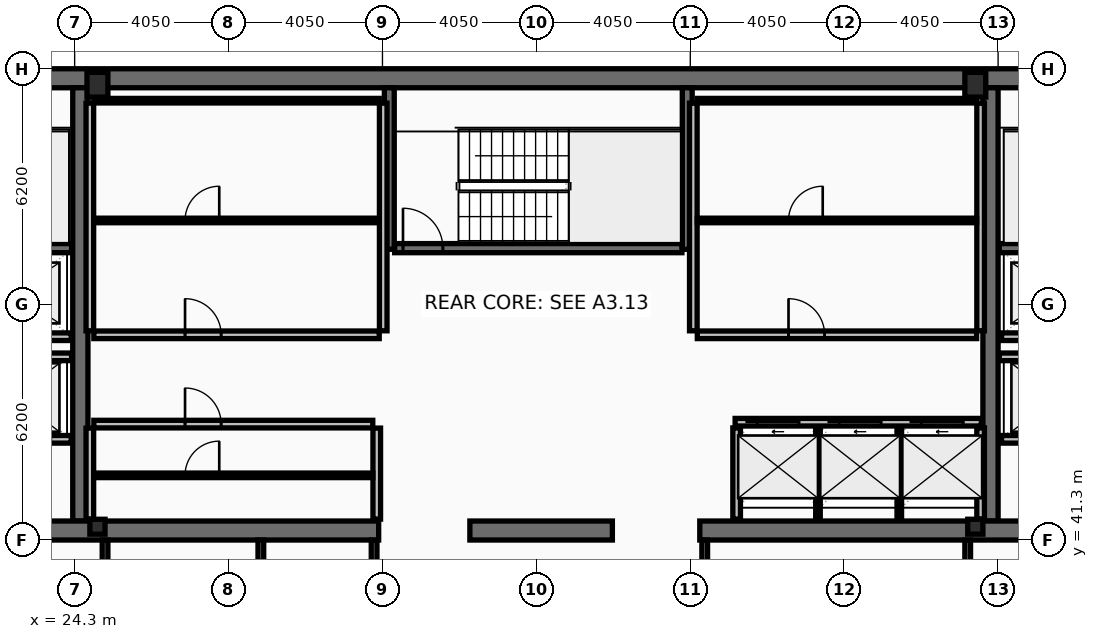
"""IFC4 building model, lengths in metres.
Left out: names, types, materials, properties, quantities, classifications, styles, units other than length and angle.
Written with IfcOpenShell. Run it as: python <this file> out.ifc"""

import sys

from ifc_helpers import new_model, si_unit, direction, frame, frame_2d, origin, origin_2d, place, context, subcontext, project, spatial, rectangle, hollow_rectangle, i_section, extrude, element, fill, save


model = new_model("IFC4")
c1 = context("Model", 3, precision=1e-05, world=origin(), true_north=direction((0.0, 1.0)))
c2 = subcontext(c1, "Body", "Model", "MODEL_VIEW")
j1 = project(units=[si_unit("LENGTHUNIT", "METRE"), si_unit("PLANEANGLEUNIT", "RADIAN")], contexts=[c1])
p1 = place(None, origin())
s1 = spatial("IfcSite", under=j1, at=p1, CompositionType="ELEMENT")
p2 = place(p1, origin())
s2 = spatial("IfcBuilding", under=s1, at=p2, CompositionType="ELEMENT")
p3 = place(p2, frame((0.0, 0.0, 302.2)))
s3 = spatial("IfcBuildingStorey", under=s2, at=p3, CompositionType="ELEMENT", Elevation=302.2)
p4 = place(p3, frame((16.2, 53.45, 0.0), z_axis=(0.0, 0.0, 1.0), x_axis=(1.0, 0.0, 0.0)))
e1 = element("IfcWall", 1, at=p4, inside=s3, PredefinedType="SHEAR", context=c2, shape_type="SweptSolid", body=[
    extrude(rectangle(XDim=40.5, YDim=0.5, at=frame_2d((20.25, 0.0))), origin(), (0.0, 0.0, 1.0), 3.38),
])
for number, where, z_axis, x_axis in (
    (2, (24.45, 41.8, 0.0), (0.0, 0.0, 1.0), (0.0, 1.0, 0.0)),
    (3, (48.4, 41.8, 0.0), (0.0, 0.0, 1.0), (0.0, 1.0, 0.0)),
):
    element("IfcWall", number, at=place(p3, frame(where, z_axis=z_axis, x_axis=x_axis)), inside=s3, PredefinedType="SHEAR", context=c2, shape_type="SweptSolid", body=[
        extrude(rectangle(XDim=11.4, YDim=0.4, at=frame_2d((5.7, 0.0))), origin(), (0.0, 0.0, 1.0), 3.38),
    ])
p5 = place(p3, frame((32.3, 41.55, 0.0), z_axis=(0.0, 0.0, 1.0), x_axis=(-1.0, 0.0, 0.0)))
e4 = element("IfcWall", 4, at=p5, inside=s3, PredefinedType="SHEAR", context=c2, shape_type="SweptSolid", body=[
    extrude(rectangle(XDim=11.45, YDim=0.5, at=frame_2d((5.725, 0.0))), origin(), (0.0, 0.0, 1.0), 3.38),
])
p6 = place(p3, frame((38.45, 41.55, 0.0), z_axis=(0.0, 0.0, 1.0), x_axis=(-1.0, 0.0, 0.0)))
e5 = element("IfcWall", 5, at=p6, inside=s3, PredefinedType="SHEAR", context=c2, shape_type="SweptSolid", body=[
    extrude(rectangle(XDim=3.75, YDim=0.5, at=frame_2d((1.875, 0.0))), origin(), (0.0, 0.0, 1.0), 3.38),
])
p7 = place(p3, frame((52.05, 41.55, 0.0), z_axis=(0.0, 0.0, 1.0), x_axis=(-1.0, 0.0, 0.0)))
e6 = element("IfcWall", 6, at=p7, inside=s3, PredefinedType="SHEAR", context=c2, shape_type="SweptSolid", body=[
    extrude(rectangle(XDim=11.3, YDim=0.5, at=frame_2d((5.65, 0.0))), origin(), (0.0, 0.0, 1.0), 3.38),
])
for number, where, z_axis, x_axis in (
    (7, (32.58, 48.95, 0.0), (0.0, 0.0, 1.0), (0.0, 1.0, 0.0)),
    (8, (40.42, 48.95, 0.0), (0.0, 0.0, 1.0), (0.0, 1.0, 0.0)),
):
    element("IfcWall", number, at=place(p3, frame(where, z_axis=z_axis, x_axis=x_axis)), inside=s3, PredefinedType="SHEAR", context=c2, shape_type="SweptSolid", body=[
        extrude(rectangle(XDim=4.25, YDim=0.26, at=frame_2d((2.125, 0.0))), origin(), (0.0, 0.0, 1.0), 3.38),
    ])
p8 = place(p3, frame((16.7, 48.98, 0.0), z_axis=(0.0, 0.0, 1.0), x_axis=(1.0, 0.0, 0.0)))
e9 = element("IfcWall", 9, at=p8, inside=s3, PredefinedType="SHEAR", context=c2, shape_type="SweptSolid", body=[
    extrude(rectangle(XDim=7.52, YDim=0.24, at=frame_2d((3.76, 0.0))), origin(), (0.0, 0.0, 1.0), 3.38),
])
p9 = place(p8, frame((0.22, 0.0, 0.0)))
e10 = element("IfcOpeningElement", 10, at=p9, cuts=e9, PredefinedType="OPENING", context=c2, shape_type="SweptSolid", body=[
    extrude(rectangle(XDim=1.05, YDim=2.15, at=frame_2d((0.525, 1.075))), frame((0.0, 0.13, 0.0), z_axis=(0.0, -1.0, 0.0), x_axis=(1.0, 0.0, 0.0)), (0.0, 0.0, 1.0), 0.26),
])
p10 = place(p3, frame((48.63, 48.98, 0.0), z_axis=(0.0, 0.0, 1.0), x_axis=(1.0, 0.0, 0.0)))
e11 = element("IfcWall", 11, at=p10, inside=s3, PredefinedType="SHEAR", context=c2, shape_type="SweptSolid", body=[
    extrude(rectangle(XDim=7.57, YDim=0.24, at=frame_2d((3.785, 0.0))), origin(), (0.0, 0.0, 1.0), 3.38),
])
p11 = place(p10, frame((6.3, 0.0, 0.0)))
e12 = element("IfcOpeningElement", 12, at=p11, cuts=e11, PredefinedType="OPENING", context=c2, shape_type="SweptSolid", body=[
    extrude(rectangle(XDim=1.05, YDim=2.15, at=frame_2d((0.525, 1.075))), frame((0.0, 0.13, 0.0), z_axis=(0.0, -1.0, 0.0), x_axis=(1.0, 0.0, 0.0)), (0.0, 0.0, 1.0), 0.26),
])
p12 = place(p3, frame((32.72, 48.98, 0.0), z_axis=(0.0, 0.0, 1.0), x_axis=(1.0, 0.0, 0.0)))
e13 = element("IfcWall", 13, at=p12, inside=s3, PredefinedType="SHEAR", context=c2, shape_type="SweptSolid", body=[
    extrude(rectangle(XDim=7.56, YDim=0.24, at=frame_2d((3.78, 0.0))), origin(), (0.0, 0.0, 1.0), 3.38),
])
p13 = place(p12, frame((0.22, 0.0, 0.0)))
e14 = element("IfcOpeningElement", 14, at=p13, cuts=e13, PredefinedType="OPENING", context=c2, shape_type="SweptSolid", body=[
    extrude(rectangle(XDim=1.05, YDim=2.15, at=frame_2d((0.525, 1.075))), frame((0.0, 0.13, 0.0), z_axis=(0.0, -1.0, 0.0), x_axis=(1.0, 0.0, 0.0)), (0.0, 0.0, 1.0), 0.26),
])
for number, where, z_axis, x_axis in (
    (15, (24.9, 53.28, 0.0), (0.0, 0.0, 1.0), (1.0, 0.0, 0.0)),
    (16, (48.0, 53.28, 0.0), (0.0, 0.0, 1.0), (1.0, 0.0, 0.0)),
):
    element("IfcColumn", number, at=place(p3, frame(where, z_axis=z_axis, x_axis=x_axis)), inside=s3, PredefinedType="COLUMN", context=c2, shape_type="SweptSolid", body=[
        extrude(hollow_rectangle(XDim=0.55, YDim=0.65, WallThickness=0.04, at=origin_2d()), origin(), (0.0, 0.0, 1.0), 3.6),
    ])
for number, where, z_axis, x_axis in (
    (17, (24.9, 41.65, 0.0), (0.0, 0.0, 1.0), (1.0, 0.0, 0.0)),
    (18, (48.0, 41.65, 0.0), (0.0, 0.0, 1.0), (1.0, 0.0, 0.0)),
):
    element("IfcColumn", number, at=place(p3, frame(where, z_axis=z_axis, x_axis=x_axis)), inside=s3, PredefinedType="COLUMN", context=c2, shape_type="SweptSolid", body=[
        extrude(i_section(OverallWidth=0.399, OverallDepth=0.393, WebThickness=0.023, FlangeThickness=0.037, at=origin_2d()), origin(), (0.0, 0.0, 1.0), 3.6),
    ])
p14 = place(p3, frame((41.68, 44.4, 0.0), z_axis=(0.0, 0.0, 1.0), x_axis=(1.0, 0.0, 0.0)))
e19 = element("IfcWall", 19, at=p14, inside=s3, PredefinedType="PARTITIONING", context=c2, shape_type="SweptSolid", body=[
    extrude(rectangle(XDim=6.48, YDim=0.2, at=frame_2d((3.24, 0.0))), origin(), (0.0, 0.0, 1.0), 3.38),
])
p15 = place(p14, frame((0.58, 0.0, 0.0)))
e20 = element("IfcOpeningElement", 20, at=p15, cuts=e19, PredefinedType="OPENING", context=c2, shape_type="SweptSolid", body=[
    extrude(rectangle(XDim=1.1, YDim=2.18, at=frame_2d((0.55, 1.09))), frame((0.0, 0.11, 0.0), z_axis=(0.0, -1.0, 0.0), x_axis=(1.0, 0.0, 0.0)), (0.0, 0.0, 1.0), 0.22),
])
p16 = place(p14, frame((2.74, 0.0, 0.0)))
e21 = element("IfcOpeningElement", 21, at=p16, cuts=e19, PredefinedType="OPENING", context=c2, shape_type="SweptSolid", body=[
    extrude(rectangle(XDim=1.1, YDim=2.18, at=frame_2d((0.55, 1.09))), frame((0.0, 0.11, 0.0), z_axis=(0.0, -1.0, 0.0), x_axis=(1.0, 0.0, 0.0)), (0.0, 0.0, 1.0), 0.22),
])
p17 = place(p14, frame((4.9, 0.0, 0.0)))
e22 = element("IfcOpeningElement", 22, at=p17, cuts=e19, PredefinedType="OPENING", context=c2, shape_type="SweptSolid", body=[
    extrude(rectangle(XDim=1.1, YDim=2.18, at=frame_2d((0.55, 1.09))), frame((0.0, 0.11, 0.0), z_axis=(0.0, -1.0, 0.0), x_axis=(1.0, 0.0, 0.0)), (0.0, 0.0, 1.0), 0.22),
])
p18 = place(p3, frame((51.61, 43.95, 0.0), z_axis=(0.0, 0.0, 1.0), x_axis=(-1.0, 0.0, 0.0)))
e23 = element("IfcWall", 23, at=p18, inside=s3, PredefinedType="PARTITIONING", context=c2, shape_type="SweptSolid", body=[
    extrude(rectangle(XDim=2.92, YDim=0.2, at=frame_2d((1.46, 0.0))), origin(), (0.0, 0.0, 1.0), 3.38),
])
p19 = place(p18, frame((0.81, 0.0, 0.0)))
e24 = element("IfcOpeningElement", 24, at=p19, cuts=e23, PredefinedType="OPENING", context=c2, shape_type="SweptSolid", body=[
    extrude(rectangle(XDim=1.3, YDim=2.18, at=frame_2d((0.65, 1.09))), frame((0.0, 0.11, 0.0), z_axis=(0.0, -1.0, 0.0), x_axis=(1.0, 0.0, 0.0)), (0.0, 0.0, 1.0), 0.22),
])
p20 = place(p3, frame((24.21, 43.95, 0.0), z_axis=(0.0, 0.0, 1.0), x_axis=(-1.0, 0.0, 0.0)))
e25 = element("IfcWall", 25, at=p20, inside=s3, PredefinedType="PARTITIONING", context=c2, shape_type="SweptSolid", body=[
    extrude(rectangle(XDim=2.97, YDim=0.2, at=frame_2d((1.485, 0.0))), origin(), (0.0, 0.0, 1.0), 3.38),
])
p21 = place(p20, frame((0.86, 0.0, 0.0)))
e26 = element("IfcOpeningElement", 26, at=p21, cuts=e25, PredefinedType="OPENING", context=c2, shape_type="SweptSolid", body=[
    extrude(rectangle(XDim=1.3, YDim=2.18, at=frame_2d((0.65, 1.09))), frame((0.0, 0.11, 0.0), z_axis=(0.0, -1.0, 0.0), x_axis=(1.0, 0.0, 0.0)), (0.0, 0.0, 1.0), 0.22),
])
p22 = place(p3, frame((51.61, 46.65, 0.0), z_axis=(0.0, 0.0, 1.0), x_axis=(-1.0, 0.0, 0.0)))
e27 = element("IfcWall", 27, at=p22, inside=s3, PredefinedType="PARTITIONING", context=c2, shape_type="SweptSolid", body=[
    extrude(rectangle(XDim=2.92, YDim=0.2, at=frame_2d((1.46, 0.0))), origin(), (0.0, 0.0, 1.0), 3.38),
])
p23 = place(p22, frame((0.86, 0.0, 0.0)))
e28 = element("IfcOpeningElement", 28, at=p23, cuts=e27, PredefinedType="OPENING", context=c2, shape_type="SweptSolid", body=[
    extrude(rectangle(XDim=1.2, YDim=2.18, at=frame_2d((0.6, 1.09))), frame((0.0, 0.11, 0.0), z_axis=(0.0, -1.0, 0.0), x_axis=(1.0, 0.0, 0.0)), (0.0, 0.0, 1.0), 0.22),
])
p24 = place(p3, frame((24.21, 46.65, 0.0), z_axis=(0.0, 0.0, 1.0), x_axis=(-1.0, 0.0, 0.0)))
e29 = element("IfcWall", 29, at=p24, inside=s3, PredefinedType="PARTITIONING", context=c2, shape_type="SweptSolid", body=[
    extrude(rectangle(XDim=2.97, YDim=0.2, at=frame_2d((1.485, 0.0))), origin(), (0.0, 0.0, 1.0), 3.38),
])
p25 = place(p24, frame((0.91, 0.0, 0.0)))
e30 = element("IfcOpeningElement", 30, at=p25, cuts=e29, PredefinedType="OPENING", context=c2, shape_type="SweptSolid", body=[
    extrude(rectangle(XDim=1.2, YDim=2.18, at=frame_2d((0.6, 1.09))), frame((0.0, 0.11, 0.0), z_axis=(0.0, -1.0, 0.0), x_axis=(1.0, 0.0, 0.0)), (0.0, 0.0, 1.0), 0.22),
])
p26 = place(p3, frame((21.2, 46.12, 0.0), z_axis=(0.0, 0.0, 1.0), x_axis=(1.0, 0.0, 0.0)))
e31 = element("IfcWall", 31, at=p26, inside=s3, PredefinedType="PARTITIONING", context=c2, shape_type="SweptSolid", body=[
    extrude(rectangle(XDim=3.02, YDim=0.2, at=frame_2d((1.51, 0.0))), origin(), (0.0, 0.0, 1.0), 3.38),
])
p27 = place(p3, frame((48.63, 46.12, 0.0), z_axis=(0.0, 0.0, 1.0), x_axis=(1.0, 0.0, 0.0)))
e32 = element("IfcWall", 32, at=p27, inside=s3, PredefinedType="PARTITIONING", context=c2, shape_type="SweptSolid", body=[
    extrude(rectangle(XDim=3.07, YDim=0.2, at=frame_2d((1.535, 0.0))), origin(), (0.0, 0.0, 1.0), 3.38),
])
for number, where, z_axis, x_axis in (
    (33, (24.7, 46.805, 0.0), (0.0, 0.0, 1.0), (0.0, 1.0, 0.0)),
    (34, (32.42, 46.805, 0.0), (0.0, 0.0, 1.0), (0.0, 1.0, 0.0)),
):
    element("IfcWall", number, at=place(p3, frame(where, z_axis=z_axis, x_axis=x_axis)), inside=s3, PredefinedType="PARTITIONING", context=c2, shape_type="SweptSolid", body=[
        extrude(rectangle(XDim=5.99, YDim=0.2, at=frame_2d((2.995, 0.0))), origin(), (0.0, 0.0, 1.0), 3.38),
    ])
p28 = place(p3, frame((24.805, 52.86, 0.0), z_axis=(0.0, 0.0, 1.0), x_axis=(1.0, 0.0, 0.0)))
e35 = element("IfcWall", 35, at=p28, inside=s3, PredefinedType="PARTITIONING", context=c2, shape_type="SweptSolid", body=[
    extrude(rectangle(XDim=7.51, YDim=0.12, at=frame_2d((3.755, 0.0))), origin(), (0.0, 0.0, 1.0), 3.38),
])
p29 = place(p3, frame((24.805, 49.709, 0.0), z_axis=(0.0, 0.0, 1.0), x_axis=(1.0, 0.0, 0.0)))
e36 = element("IfcWall", 36, at=p29, inside=s3, PredefinedType="PARTITIONING", context=c2, shape_type="SweptSolid", body=[
    extrude(rectangle(XDim=7.51, YDim=0.12, at=frame_2d((3.755, 0.0))), origin(), (0.0, 0.0, 1.0), 3.38),
])
p30 = place(p29, frame((2.4, 0.0, 0.0)))
e37 = element("IfcOpeningElement", 37, at=p30, cuts=e36, PredefinedType="OPENING", context=c2, shape_type="SweptSolid", body=[
    extrude(rectangle(XDim=0.9, YDim=2.05, at=frame_2d((0.45, 1.025))), frame((0.0, 0.07, 0.0), z_axis=(0.0, -1.0, 0.0), x_axis=(1.0, 0.0, 0.0)), (0.0, 0.0, 1.0), 0.14),
])
p31 = place(p3, frame((24.805, 46.7, 0.0), z_axis=(0.0, 0.0, 1.0), x_axis=(1.0, 0.0, 0.0)))
e38 = element("IfcWall", 38, at=p31, inside=s3, PredefinedType="PARTITIONING", context=c2, shape_type="SweptSolid", body=[
    extrude(rectangle(XDim=7.51, YDim=0.2, at=frame_2d((3.755, 0.0))), origin(), (0.0, 0.0, 1.0), 3.38),
])
p32 = place(p31, frame((2.4, 0.0, 0.0)))
e39 = element("IfcOpeningElement", 39, at=p32, cuts=e38, PredefinedType="OPENING", context=c2, shape_type="SweptSolid", body=[
    extrude(rectangle(XDim=0.95, YDim=2.1, at=frame_2d((0.475, 1.05))), frame((0.0, 0.11, 0.0), z_axis=(0.0, -1.0, 0.0), x_axis=(1.0, 0.0, 0.0)), (0.0, 0.0, 1.0), 0.22),
])
for number, where, z_axis, x_axis in (
    (40, (24.7, 41.85, 0.0), (0.0, 0.0, 1.0), (0.0, 1.0, 0.0)),
    (41, (32.25, 41.85, 0.0), (0.0, 0.0, 1.0), (0.0, 1.0, 0.0)),
):
    element("IfcWall", number, at=place(p3, frame(where, z_axis=z_axis, x_axis=x_axis)), inside=s3, PredefinedType="PARTITIONING", context=c2, shape_type="SweptSolid", body=[
        extrude(rectangle(XDim=2.395, YDim=0.2, at=frame_2d((1.198, 0.0))), origin(), (0.0, 0.0, 1.0), 3.38),
    ])
p33 = place(p3, frame((24.805, 43.002, 0.0), z_axis=(0.0, 0.0, 1.0), x_axis=(1.0, 0.0, 0.0)))
e42 = element("IfcWall", 42, at=p33, inside=s3, PredefinedType="PARTITIONING", context=c2, shape_type="SweptSolid", body=[
    extrude(rectangle(XDim=7.34, YDim=0.12, at=frame_2d((3.67, 0.0))), origin(), (0.0, 0.0, 1.0), 3.38),
])
p34 = place(p33, frame((2.4, 0.0, 0.0)))
e43 = element("IfcOpeningElement", 43, at=p34, cuts=e42, PredefinedType="OPENING", context=c2, shape_type="SweptSolid", body=[
    extrude(rectangle(XDim=0.9, YDim=2.05, at=frame_2d((0.45, 1.025))), frame((0.0, 0.07, 0.0), z_axis=(0.0, -1.0, 0.0), x_axis=(1.0, 0.0, 0.0)), (0.0, 0.0, 1.0), 0.14),
])
p35 = place(p3, frame((24.805, 44.35, 0.0), z_axis=(0.0, 0.0, 1.0), x_axis=(1.0, 0.0, 0.0)))
e44 = element("IfcWall", 44, at=p35, inside=s3, PredefinedType="PARTITIONING", context=c2, shape_type="SweptSolid", body=[
    extrude(rectangle(XDim=7.34, YDim=0.2, at=frame_2d((3.67, 0.0))), origin(), (0.0, 0.0, 1.0), 3.38),
])
p36 = place(p35, frame((2.4, 0.0, 0.0)))
e45 = element("IfcOpeningElement", 45, at=p36, cuts=e44, PredefinedType="OPENING", context=c2, shape_type="SweptSolid", body=[
    extrude(rectangle(XDim=0.95, YDim=2.1, at=frame_2d((0.475, 1.05))), frame((0.0, 0.11, 0.0), z_axis=(0.0, -1.0, 0.0), x_axis=(1.0, 0.0, 0.0)), (0.0, 0.0, 1.0), 0.22),
])
for number, where, z_axis, x_axis in (
    (46, (40.58, 46.805, 0.0), (0.0, 0.0, 1.0), (0.0, 1.0, 0.0)),
    (47, (48.14, 46.805, 0.0), (0.0, 0.0, 1.0), (0.0, 1.0, 0.0)),
):
    element("IfcWall", number, at=place(p3, frame(where, z_axis=z_axis, x_axis=x_axis)), inside=s3, PredefinedType="PARTITIONING", context=c2, shape_type="SweptSolid", body=[
        extrude(rectangle(XDim=5.99, YDim=0.2, at=frame_2d((2.995, 0.0))), origin(), (0.0, 0.0, 1.0), 3.38),
    ])
p37 = place(p3, frame((40.685, 52.86, 0.0), z_axis=(0.0, 0.0, 1.0), x_axis=(1.0, 0.0, 0.0)))
e48 = element("IfcWall", 48, at=p37, inside=s3, PredefinedType="PARTITIONING", context=c2, shape_type="SweptSolid", body=[
    extrude(rectangle(XDim=7.35, YDim=0.12, at=frame_2d((3.675, 0.0))), origin(), (0.0, 0.0, 1.0), 3.38),
])
p38 = place(p3, frame((40.685, 49.709, 0.0), z_axis=(0.0, 0.0, 1.0), x_axis=(1.0, 0.0, 0.0)))
e49 = element("IfcWall", 49, at=p38, inside=s3, PredefinedType="PARTITIONING", context=c2, shape_type="SweptSolid", body=[
    extrude(rectangle(XDim=7.35, YDim=0.12, at=frame_2d((3.675, 0.0))), origin(), (0.0, 0.0, 1.0), 3.38),
])
p39 = place(p38, frame((2.4, 0.0, 0.0)))
e50 = element("IfcOpeningElement", 50, at=p39, cuts=e49, PredefinedType="OPENING", context=c2, shape_type="SweptSolid", body=[
    extrude(rectangle(XDim=0.9, YDim=2.05, at=frame_2d((0.45, 1.025))), frame((0.0, 0.07, 0.0), z_axis=(0.0, -1.0, 0.0), x_axis=(1.0, 0.0, 0.0)), (0.0, 0.0, 1.0), 0.14),
])
p40 = place(p3, frame((40.685, 46.7, 0.0), z_axis=(0.0, 0.0, 1.0), x_axis=(1.0, 0.0, 0.0)))
e51 = element("IfcWall", 51, at=p40, inside=s3, PredefinedType="PARTITIONING", context=c2, shape_type="SweptSolid", body=[
    extrude(rectangle(XDim=7.35, YDim=0.2, at=frame_2d((3.675, 0.0))), origin(), (0.0, 0.0, 1.0), 3.38),
])
p41 = place(p40, frame((2.4, 0.0, 0.0)))
e52 = element("IfcOpeningElement", 52, at=p41, cuts=e51, PredefinedType="OPENING", context=c2, shape_type="SweptSolid", body=[
    extrude(rectangle(XDim=0.95, YDim=2.1, at=frame_2d((0.475, 1.05))), frame((0.0, 0.11, 0.0), z_axis=(0.0, -1.0, 0.0), x_axis=(1.0, 0.0, 0.0)), (0.0, 0.0, 1.0), 0.22),
])
for number, where, z_axis, x_axis in (
    (53, (41.72, 41.85, 0.0), (0.0, 0.0, 1.0), (0.0, 1.0, 0.0)),
    (54, (48.14, 41.85, 0.0), (0.0, 0.0, 1.0), (0.0, 1.0, 0.0)),
):
    element("IfcWall", number, at=place(p3, frame(where, z_axis=z_axis, x_axis=x_axis)), inside=s3, PredefinedType="PARTITIONING", context=c2, shape_type="SweptSolid", body=[
        extrude(rectangle(XDim=2.4, YDim=0.2, at=frame_2d((1.2, 0.0))), origin(), (0.0, 0.0, 1.0), 3.38),
    ])
for number, where, z_axis, x_axis in (
    (55, (43.86, 41.85, 0.0), (0.0, 0.0, 1.0), (0.0, 1.0, 0.0)),
    (56, (46.0, 41.85, 0.0), (0.0, 0.0, 1.0), (0.0, 1.0, 0.0)),
):
    element("IfcWall", number, at=place(p3, frame(where, z_axis=z_axis, x_axis=x_axis)), inside=s3, PredefinedType="PARTITIONING", context=c2, shape_type="SweptSolid", body=[
        extrude(rectangle(XDim=2.4, YDim=0.12, at=frame_2d((1.2, 0.0))), origin(), (0.0, 0.0, 1.0), 3.38),
    ])
p42 = place(p3, frame((25.1, 38.28, 0.0), z_axis=(0.0, 0.0, 1.0), x_axis=(0.0, 1.0, 0.0)))
e57 = element("IfcWall", 57, at=p42, inside=s3, PredefinedType="PARTITIONING", context=c2, shape_type="SweptSolid", body=[
    extrude(rectangle(XDim=3.02, YDim=0.15, at=frame_2d((1.51, 0.0))), origin(), (0.0, 0.0, 1.0), 2.72),
])
for number, where, z_axis, x_axis in (
    (58, (29.2, 38.28, 0.0), (0.0, 0.0, 1.0), (0.0, 1.0, 0.0)),
    (59, (32.18, 38.28, 0.0), (0.0, 0.0, 1.0), (0.0, 1.0, 0.0)),
    (60, (40.88, 38.28, 0.0), (0.0, 0.0, 1.0), (0.0, 1.0, 0.0)),
):
    element("IfcWall", number, at=place(p3, frame(where, z_axis=z_axis, x_axis=x_axis)), inside=s3, PredefinedType="PARTITIONING", context=c2, shape_type="SweptSolid", body=[
        extrude(rectangle(XDim=3.02, YDim=0.15, at=frame_2d((1.51, 0.0))), origin(), (0.0, 0.0, 1.0), 3.38),
    ])
p43 = place(p3, frame((47.8, 38.28, 0.0), z_axis=(0.0, 0.0, 1.0), x_axis=(0.0, 1.0, 0.0)))
e61 = element("IfcWall", 61, at=p43, inside=s3, PredefinedType="PARTITIONING", context=c2, shape_type="SweptSolid", body=[
    extrude(rectangle(XDim=3.02, YDim=0.15, at=frame_2d((1.51, 0.0))), origin(), (0.0, 0.0, 1.0), 2.72),
])
p44 = place(p13, origin())
e62 = element("IfcDoor", 62, at=p44, inside=s3, OperationType="SINGLE_SWING_LEFT", PredefinedType="DOOR", context=c2, shape_type="SweptSolid", body=[
    extrude(rectangle(XDim=1.05, YDim=2.15, at=frame_2d((0.525, 1.075))), frame((0.0, 0.025, 0.0), z_axis=(0.0, -1.0, 0.0), x_axis=(1.0, 0.0, 0.0)), (0.0, 0.0, 1.0), 0.05),
])
fill(e14, e62)
p45 = place(p15, origin())
e63 = element("IfcDoor", 63, at=p45, inside=s3, OperationType="SLIDING_TO_LEFT", PredefinedType="DOOR", context=c2, shape_type="SweptSolid", body=[
    extrude(rectangle(XDim=1.1, YDim=2.18, at=frame_2d((0.55, 1.09))), frame((0.0, 0.025, 0.0), z_axis=(0.0, -1.0, 0.0), x_axis=(1.0, 0.0, 0.0)), (0.0, 0.0, 1.0), 0.05),
])
fill(e20, e63)
p46 = place(p16, origin())
e64 = element("IfcDoor", 64, at=p46, inside=s3, OperationType="SLIDING_TO_LEFT", PredefinedType="DOOR", context=c2, shape_type="SweptSolid", body=[
    extrude(rectangle(XDim=1.1, YDim=2.18, at=frame_2d((0.55, 1.09))), frame((0.0, 0.025, 0.0), z_axis=(0.0, -1.0, 0.0), x_axis=(1.0, 0.0, 0.0)), (0.0, 0.0, 1.0), 0.05),
])
fill(e21, e64)
p47 = place(p17, origin())
e65 = element("IfcDoor", 65, at=p47, inside=s3, OperationType="SLIDING_TO_LEFT", PredefinedType="DOOR", context=c2, shape_type="SweptSolid", body=[
    extrude(rectangle(XDim=1.1, YDim=2.18, at=frame_2d((0.55, 1.09))), frame((0.0, 0.025, 0.0), z_axis=(0.0, -1.0, 0.0), x_axis=(1.0, 0.0, 0.0)), (0.0, 0.0, 1.0), 0.05),
])
fill(e22, e65)
p48 = place(p30, origin())
e66 = element("IfcDoor", 66, at=p48, inside=s3, OperationType="SINGLE_SWING_RIGHT", PredefinedType="DOOR", context=c2, shape_type="SweptSolid", body=[
    extrude(rectangle(XDim=0.9, YDim=2.05, at=frame_2d((0.45, 1.025))), frame((0.0, 0.025, 0.0), z_axis=(0.0, -1.0, 0.0), x_axis=(1.0, 0.0, 0.0)), (0.0, 0.0, 1.0), 0.05),
])
fill(e37, e66)
p49 = place(p32, origin())
e67 = element("IfcDoor", 67, at=p49, inside=s3, OperationType="SINGLE_SWING_LEFT", PredefinedType="DOOR", context=c2, shape_type="SweptSolid", body=[
    extrude(rectangle(XDim=0.95, YDim=2.1, at=frame_2d((0.475, 1.05))), frame((0.0, 0.025, 0.0), z_axis=(0.0, -1.0, 0.0), x_axis=(1.0, 0.0, 0.0)), (0.0, 0.0, 1.0), 0.05),
])
fill(e39, e67)
p50 = place(p34, origin())
e68 = element("IfcDoor", 68, at=p50, inside=s3, OperationType="SINGLE_SWING_RIGHT", PredefinedType="DOOR", context=c2, shape_type="SweptSolid", body=[
    extrude(rectangle(XDim=0.9, YDim=2.05, at=frame_2d((0.45, 1.025))), frame((0.0, 0.025, 0.0), z_axis=(0.0, -1.0, 0.0), x_axis=(1.0, 0.0, 0.0)), (0.0, 0.0, 1.0), 0.05),
])
fill(e43, e68)
p51 = place(p36, origin())
e69 = element("IfcDoor", 69, at=p51, inside=s3, OperationType="SINGLE_SWING_LEFT", PredefinedType="DOOR", context=c2, shape_type="SweptSolid", body=[
    extrude(rectangle(XDim=0.95, YDim=2.1, at=frame_2d((0.475, 1.05))), frame((0.0, 0.025, 0.0), z_axis=(0.0, -1.0, 0.0), x_axis=(1.0, 0.0, 0.0)), (0.0, 0.0, 1.0), 0.05),
])
fill(e45, e69)
p52 = place(p39, origin())
e70 = element("IfcDoor", 70, at=p52, inside=s3, OperationType="SINGLE_SWING_RIGHT", PredefinedType="DOOR", context=c2, shape_type="SweptSolid", body=[
    extrude(rectangle(XDim=0.9, YDim=2.05, at=frame_2d((0.45, 1.025))), frame((0.0, 0.025, 0.0), z_axis=(0.0, -1.0, 0.0), x_axis=(1.0, 0.0, 0.0)), (0.0, 0.0, 1.0), 0.05),
])
fill(e50, e70)
p53 = place(p41, origin())
e71 = element("IfcDoor", 71, at=p53, inside=s3, OperationType="SINGLE_SWING_LEFT", PredefinedType="DOOR", context=c2, shape_type="SweptSolid", body=[
    extrude(rectangle(XDim=0.95, YDim=2.1, at=frame_2d((0.475, 1.05))), frame((0.0, 0.025, 0.0), z_axis=(0.0, -1.0, 0.0), x_axis=(1.0, 0.0, 0.0)), (0.0, 0.0, 1.0), 0.05),
])
fill(e52, e71)
save(model, sys.argv[1])
